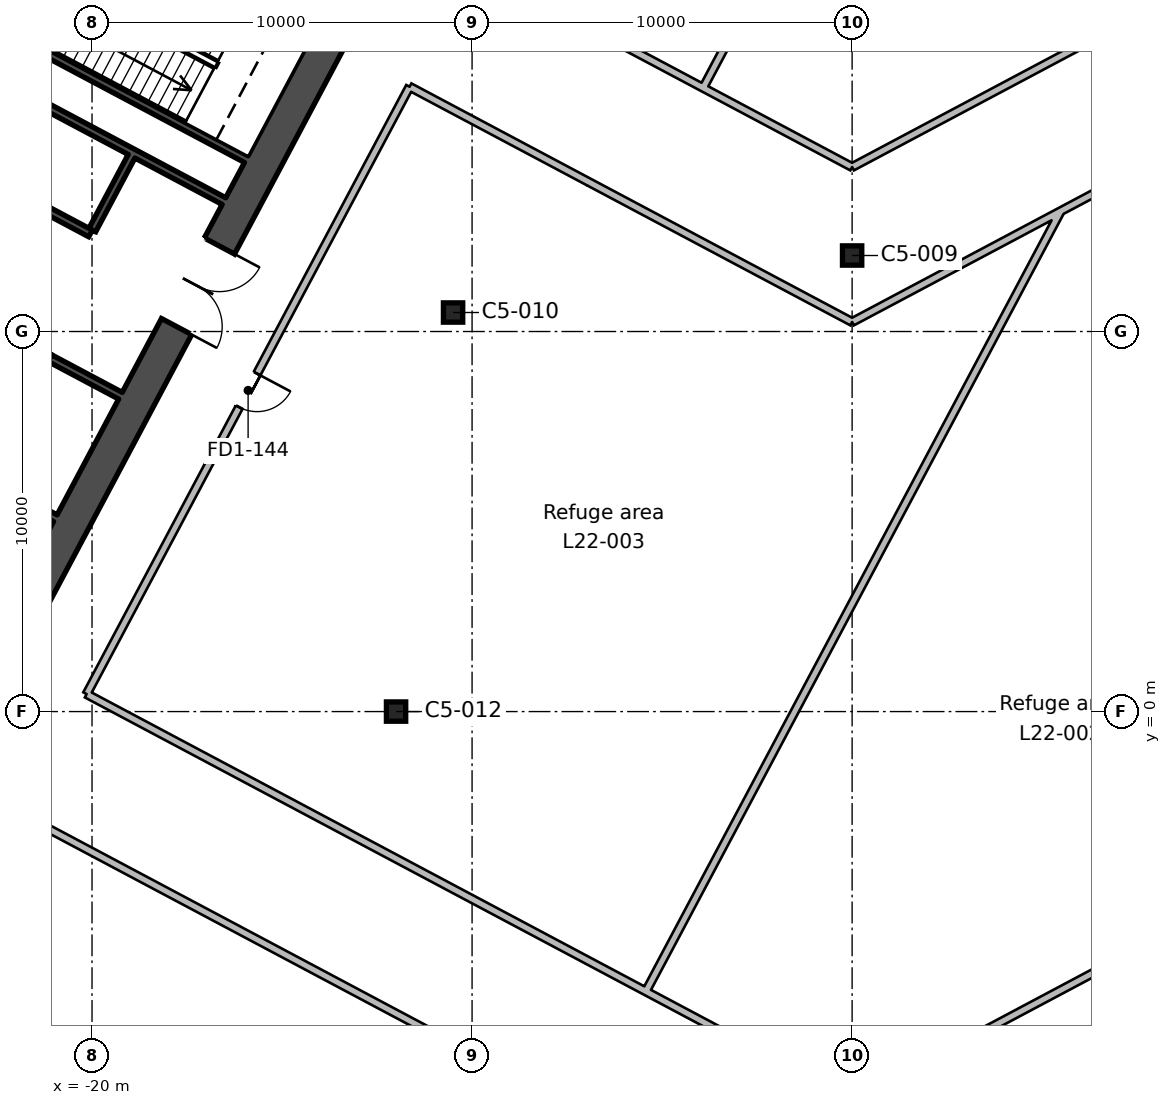
"""IFC4 building model, lengths in metres.
Left out: names, types, materials, properties, quantities, classifications, styles, units other than length and angle.
Written with IfcOpenShell. Run it as: python <this file> out.ifc"""

import sys

from ifc_helpers import new_model, si_unit, direction, frame, frame_2d, origin, origin_2d, place, context, subcontext, project, spatial, rectangle, hollow_rectangle, extrude, element, fill, save


model = new_model("IFC4")
c1 = context("Model", 3, precision=1e-05, world=origin(), true_north=direction((0.0, 1.0)))
c2 = subcontext(c1, "Body", "Model", "MODEL_VIEW")
j1 = project(units=[si_unit("LENGTHUNIT", "METRE"), si_unit("PLANEANGLEUNIT", "RADIAN")], contexts=[c1])
p1 = place(None, origin())
s1 = spatial("IfcSite", under=j1, at=p1, CompositionType="ELEMENT")
p2 = place(p1, origin())
s2 = spatial("IfcBuilding", under=s1, at=p2, CompositionType="ELEMENT")
p3 = place(p2, frame((0.0, 0.0, 112.2)))
s3 = spatial("IfcBuildingStorey", under=s2, at=p3, CompositionType="ELEMENT", Elevation=112.2)
for number, where, z_axis, x_axis in (
    (1, (-12.0, 0.0, 0.0), (0.0, 0.0, 1.0), (1.0, 0.0, 0.0)),
    (2, (-10.5, 10.5, 0.0), (0.0, 0.0, 1.0), (1.0, 0.0, 0.0)),
    (3, (0.0, 12.0, 0.0), (0.0, 0.0, 1.0), (1.0, 0.0, 0.0)),
):
    element("IfcColumn", number, at=place(p3, frame(where, z_axis=z_axis, x_axis=x_axis)), inside=s3, PredefinedType="COLUMN", context=c2, shape_type="SweptSolid", body=[
        extrude(hollow_rectangle(XDim=0.508, YDim=0.508, WallThickness=0.021, InnerFilletRadius=0.01, OuterFilletRadius=0.031, at=origin_2d()), origin(), (0.0, 0.0, 1.0), 6.0),
    ])
p4 = place(p3, frame((-13.362, 18.43, 0.0), z_axis=(0.0, 0.0, 1.0), x_axis=(-0.46947084998, -0.882947971864, 0.0)))
e4 = element("IfcWall", 4, at=p4, inside=s3, PredefinedType="SHEAR", context=c2, shape_type="SweptSolid", body=[
    extrude(rectangle(XDim=20.0, YDim=0.9, at=frame_2d((10.0, 0.0))), origin(), (0.0, 0.0, 1.0), 6.0),
])
p5 = place(p4, frame((7.0, 0.0, 0.0)))
e5 = element("IfcOpeningElement", 5, at=p5, cuts=e4, PredefinedType="OPENING", context=c2, shape_type="SweptSolid", body=[
    extrude(rectangle(XDim=2.4, YDim=2.4, at=frame_2d((1.2, 1.2))), frame((0.0, 0.46, 0.0), z_axis=(0.0, -1.0, 0.0), x_axis=(1.0, 0.0, 0.0)), (0.0, 0.0, 1.0), 0.92),
])
p6 = place(p3, frame((-18.96, 14.611, 0.0), z_axis=(0.0, 0.0, 1.0), x_axis=(-0.4694473164, -0.882960484464, 0.0)))
e6 = element("IfcWall", 6, at=p6, inside=s3, PredefinedType="SHEAR", context=c2, shape_type="SweptSolid", body=[
    extrude(rectangle(XDim=2.2, YDim=0.2, at=frame_2d((1.1, 0.0))), origin(), (0.0, 0.0, 1.0), 6.0),
])
p7 = place(p3, frame((-15.942, 14.536, 0.0), z_axis=(0.0, 0.0, 1.0), x_axis=(-0.882946947542, 0.469472776449, 0.0)))
e7 = element("IfcWall", 7, at=p7, inside=s3, PredefinedType="SHEAR", context=c2, shape_type="SweptSolid", body=[
    extrude(rectangle(XDim=8.0, YDim=0.2, at=frame_2d((4.0, 0.0))), origin(), (0.0, 0.0, 1.0), 6.0),
])
p8 = place(p3, frame((-16.529, 13.432, 0.0), z_axis=(0.0, 0.0, 1.0), x_axis=(-0.88295287151, 0.469461634952, 0.0)))
e8 = element("IfcWall", 8, at=p8, inside=s3, PredefinedType="SHEAR", context=c2, shape_type="SweptSolid", body=[
    extrude(rectangle(XDim=8.0, YDim=0.2, at=frame_2d((4.0, 0.0))), origin(), (0.0, 0.0, 1.0), 6.0),
])
p9 = place(p3, frame((-20.04, 12.581, 0.0), z_axis=(0.0, 0.0, 1.0), x_axis=(-0.882942972946, 0.469480251476, 0.0)))
e9 = element("IfcWall", 9, at=p9, inside=s3, PredefinedType="SHEAR", context=c2, shape_type="SweptSolid", body=[
    extrude(rectangle(XDim=5.4, YDim=0.2, at=frame_2d((2.7, 0.0))), origin(), (0.0, 0.0, 1.0), 6.0),
])
p10 = place(p9, frame((2.25, 0.0, 0.0)))
e10 = element("IfcOpeningElement", 10, at=p10, cuts=e9, PredefinedType="OPENING", context=c2, shape_type="SweptSolid", body=[
    extrude(rectangle(XDim=0.9, YDim=2.1, at=frame_2d((0.45, 1.05))), frame((0.0, 0.11, 0.0), z_axis=(0.0, -1.0, 0.0), x_axis=(1.0, 0.0, 0.0)), (0.0, 0.0, 1.0), 0.22),
])
p11 = place(p3, frame((-19.252, 8.311, 0.0), z_axis=(0.0, 0.0, 1.0), x_axis=(-0.882955722218, 0.469456273365, 0.0)))
e11 = element("IfcWall", 11, at=p11, inside=s3, PredefinedType="SHEAR", context=c2, shape_type="SweptSolid", body=[
    extrude(rectangle(XDim=10.0, YDim=0.2, at=frame_2d((5.0, 0.0))), origin(), (0.0, 0.0, 1.0), 6.0),
])
p12 = place(p11, frame((2.1, 0.0, 0.0)))
e12 = element("IfcOpeningElement", 12, at=p12, cuts=e11, PredefinedType="OPENING", context=c2, shape_type="SweptSolid", body=[
    extrude(rectangle(XDim=1.2, YDim=2.1, at=frame_2d((0.6, 1.05))), frame((0.0, 0.11, 0.0), z_axis=(0.0, -1.0, 0.0), x_axis=(1.0, 0.0, 0.0)), (0.0, 0.0, 1.0), 0.22),
])
p13 = place(p3, frame((-20.965, 5.088, 0.0), z_axis=(0.0, 0.0, 1.0), x_axis=(-0.882925986334, 0.469512196493, 0.0)))
e13 = element("IfcWall", 13, at=p13, inside=s3, PredefinedType="SHEAR", context=c2, shape_type="SweptSolid", body=[
    extrude(rectangle(XDim=4.5, YDim=0.2, at=frame_2d((2.25, 0.0))), origin(), (0.0, 0.0, 1.0), 6.0),
])
p14 = place(p13, frame((0.6, 0.0, 0.0)))
e14 = element("IfcOpeningElement", 14, at=p14, cuts=e13, PredefinedType="OPENING", context=c2, shape_type="SweptSolid", body=[
    extrude(rectangle(XDim=1.1, YDim=2.1, at=frame_2d((0.55, 1.05))), frame((0.0, 0.11, 0.0), z_axis=(0.0, -1.0, 0.0), x_axis=(1.0, 0.0, 0.0)), (0.0, 0.0, 1.0), 0.22),
])
p15 = place(p3, frame((-8.114, -10.013, 0.0), z_axis=(0.0, 0.0, 1.0), x_axis=(-0.882945090575, 0.469476268866, 0.0)))
e15 = element("IfcWall", 15, at=p15, inside=s3, PredefinedType="PARTITIONING", context=c2, shape_type="SweptSolid", body=[
    extrude(rectangle(XDim=41.437, YDim=0.2, at=frame_2d((20.719, 0.0))), origin(), (0.0, 0.0, 1.0), 5.55),
])
p16 = place(p15, frame((21.45, 0.0, 0.0)))
e16 = element("IfcOpeningElement", 16, at=p16, cuts=e15, PredefinedType="OPENING", context=c2, shape_type="SweptSolid", body=[
    extrude(rectangle(XDim=1.0, YDim=2.1, at=frame_2d((0.5, 1.05))), frame((0.0, 0.11, 0.0), z_axis=(0.0, -1.0, 0.0), x_axis=(1.0, 0.0, 0.0)), (0.0, 0.0, 1.0), 0.22),
])
p17 = place(p15, frame((19.75, 0.0, 0.0)))
e17 = element("IfcOpeningElement", 17, at=p17, cuts=e15, PredefinedType="OPENING", context=c2, shape_type="SweptSolid", body=[
    extrude(rectangle(XDim=1.0, YDim=2.1, at=frame_2d((0.5, 1.05))), frame((0.0, 0.11, 0.0), z_axis=(0.0, -1.0, 0.0), x_axis=(1.0, 0.0, 0.0)), (0.0, 0.0, 1.0), 0.22),
])
p18 = place(p3, frame((-32.823, 31.779, 0.0), z_axis=(0.0, 0.0, 1.0), x_axis=(0.88294925653, -0.469468433863, 0.0)))
e18 = element("IfcWall", 18, at=p18, inside=s3, PredefinedType="PARTITIONING", context=c2, shape_type="SweptSolid", body=[
    extrude(rectangle(XDim=37.174, YDim=0.2, at=frame_2d((18.587, 0.0))), origin(), (0.0, 0.0, 1.0), 5.55),
])
p19 = place(p18, frame((18.05, 0.0, 0.0)))
e19 = element("IfcOpeningElement", 19, at=p19, cuts=e18, PredefinedType="OPENING", context=c2, shape_type="SweptSolid", body=[
    extrude(rectangle(XDim=1.0, YDim=2.1, at=frame_2d((0.5, 1.05))), frame((0.0, 0.11, 0.0), z_axis=(0.0, -1.0, 0.0), x_axis=(1.0, 0.0, 0.0)), (0.0, 0.0, 1.0), 0.22),
])
p20 = place(p18, frame((9.05, 0.0, 0.0)))
e20 = element("IfcOpeningElement", 20, at=p20, cuts=e18, PredefinedType="OPENING", context=c2, shape_type="SweptSolid", body=[
    extrude(rectangle(XDim=1.0, YDim=2.1, at=frame_2d((0.5, 1.05))), frame((0.0, 0.11, 0.0), z_axis=(0.0, -1.0, 0.0), x_axis=(1.0, 0.0, 0.0)), (0.0, 0.0, 1.0), 0.22),
])
p21 = place(p3, frame((0.0, 14.327, 0.0), z_axis=(0.0, 0.0, 1.0), x_axis=(0.882944972043, 0.46947649179, 0.0)))
e21 = element("IfcWall", 21, at=p21, inside=s3, PredefinedType="PARTITIONING", context=c2, shape_type="SweptSolid", body=[
    extrude(rectangle(XDim=35.482, YDim=0.2, at=frame_2d((17.741, 0.0))), origin(), (0.0, 0.0, 1.0), 5.55),
])
p22 = place(p21, frame((25.65, 0.0, 0.0)))
e22 = element("IfcOpeningElement", 22, at=p22, cuts=e21, PredefinedType="OPENING", context=c2, shape_type="SweptSolid", body=[
    extrude(rectangle(XDim=1.0, YDim=2.1, at=frame_2d((0.5, 1.05))), frame((0.0, 0.11, 0.0), z_axis=(0.0, -1.0, 0.0), x_axis=(1.0, 0.0, 0.0)), (0.0, 0.0, 1.0), 0.22),
])
p23 = place(p21, frame((17.25, 0.0, 0.0)))
e23 = element("IfcOpeningElement", 23, at=p23, cuts=e21, PredefinedType="OPENING", context=c2, shape_type="SweptSolid", body=[
    extrude(rectangle(XDim=1.0, YDim=2.1, at=frame_2d((0.5, 1.05))), frame((0.0, 0.11, 0.0), z_axis=(0.0, -1.0, 0.0), x_axis=(1.0, 0.0, 0.0)), (0.0, 0.0, 1.0), 0.22),
])
p24 = place(p21, frame((8.55, 0.0, 0.0)))
e24 = element("IfcOpeningElement", 24, at=p24, cuts=e21, PredefinedType="OPENING", context=c2, shape_type="SweptSolid", body=[
    extrude(rectangle(XDim=1.0, YDim=2.1, at=frame_2d((0.5, 1.05))), frame((0.0, 0.11, 0.0), z_axis=(0.0, -1.0, 0.0), x_axis=(1.0, 0.0, 0.0)), (0.0, 0.0, 1.0), 0.22),
])
p25 = place(p3, frame((-20.142, 0.46, 0.0), z_axis=(0.0, 0.0, 1.0), x_axis=(0.469506937019, 0.882928783136, 0.0)))
e25 = element("IfcWall", 25, at=p25, inside=s3, PredefinedType="PARTITIONING", context=c2, shape_type="SweptSolid", body=[
    extrude(rectangle(XDim=18.1, YDim=0.2, at=frame_2d((9.05, 0.0))), origin(), (0.0, 0.0, 1.0), 5.55),
])
p26 = place(p25, frame((8.55, 0.0, 0.0)))
e26 = element("IfcOpeningElement", 26, at=p26, cuts=e25, PredefinedType="OPENING", context=c2, shape_type="SweptSolid", body=[
    extrude(rectangle(XDim=1.0, YDim=2.1, at=frame_2d((0.5, 1.05))), frame((0.0, 0.11, 0.0), z_axis=(0.0, -1.0, 0.0), x_axis=(1.0, 0.0, 0.0)), (0.0, 0.0, 1.0), 0.22),
])
p27 = place(p3, frame((-11.644, 16.441, 0.0), z_axis=(0.0, 0.0, 1.0), x_axis=(0.882949196505, -0.469468546753, 0.0)))
e27 = element("IfcWall", 27, at=p27, inside=s3, PredefinedType="PARTITIONING", context=c2, shape_type="SweptSolid", body=[
    extrude(rectangle(XDim=5.355, YDim=0.2, at=frame_2d((2.677, 0.0))), origin(), (0.0, 0.0, 1.0), 5.55),
])
p28 = place(p3, frame((-5.427, -7.364, 0.0), z_axis=(0.0, 0.0, 1.0), x_axis=(-0.882951980563, 0.469463310622, 0.0)))
e28 = element("IfcWall", 28, at=p28, inside=s3, PredefinedType="PARTITIONING", context=c2, shape_type="SweptSolid", body=[
    extrude(rectangle(XDim=16.666, YDim=0.2, at=frame_2d((8.333, 0.0))), origin(), (0.0, 0.0, 1.0), 5.55),
])
p29 = place(p3, frame((0.105, 23.984, 0.0), z_axis=(0.0, 0.0, 1.0), x_axis=(-0.469314098299, -0.883031300203, 0.0)))
e29 = element("IfcWall", 29, at=p29, inside=s3, PredefinedType="PARTITIONING", context=c2, shape_type="SweptSolid", body=[
    extrude(rectangle(XDim=8.576, YDim=0.2, at=frame_2d((4.288, 0.0))), origin(), (0.0, 0.0, 1.0), 5.55),
])
p30 = place(p3, frame((5.491, 13.169, 0.0), z_axis=(0.0, 0.0, 1.0), x_axis=(-0.882991151497, -0.469389631733, 0.0)))
e30 = element("IfcWall", 30, at=p30, inside=s3, PredefinedType="PARTITIONING", context=c2, shape_type="SweptSolid", body=[
    extrude(rectangle(XDim=6.219, YDim=0.2, at=frame_2d((3.109, 0.0))), origin(), (0.0, 0.0, 1.0), 5.55),
])
p31 = place(p3, frame((0.0, 10.25, 0.0), z_axis=(0.0, 0.0, 1.0), x_axis=(-0.882963933612, 0.469440829008, 0.0)))
e31 = element("IfcWall", 31, at=p31, inside=s3, PredefinedType="PARTITIONING", context=c2, shape_type="SweptSolid", body=[
    extrude(rectangle(XDim=7.833, YDim=0.2, at=frame_2d((3.917, 0.0))), origin(), (0.0, 0.0, 1.0), 5.55),
])
p32 = place(p3, frame((10.861, -4.475, 0.0), z_axis=(0.0, 0.0, 1.0), x_axis=(-0.882948888511, -0.469469126011, 0.0)))
e32 = element("IfcWall", 32, at=p32, inside=s3, PredefinedType="PARTITIONING", context=c2, shape_type="SweptSolid", body=[
    extrude(rectangle(XDim=12.301, YDim=0.2, at=frame_2d((6.15, 0.0))), origin(), (0.0, 0.0, 1.0), 5.55),
])
p33 = place(p3, frame((0.0, -10.25, 0.0), z_axis=(0.0, 0.0, 1.0), x_axis=(-0.882920737254, 0.469522067348, 0.0)))
e33 = element("IfcWall", 33, at=p33, inside=s3, PredefinedType="PARTITIONING", context=c2, shape_type="SweptSolid", body=[
    extrude(rectangle(XDim=6.147, YDim=0.2, at=frame_2d((3.073, 0.0))), origin(), (0.0, 0.0, 1.0), 5.55),
])
p34 = place(p3, frame((-5.427, -7.364, 0.0), z_axis=(0.0, 0.0, 1.0), x_axis=(0.469484998898, 0.88294044862, 0.0)))
e34 = element("IfcWall", 34, at=p34, inside=s3, PredefinedType="PARTITIONING", context=c2, shape_type="SweptSolid", body=[
    extrude(rectangle(XDim=23.255, YDim=0.2, at=frame_2d((11.627, 0.0))), origin(), (0.0, 0.0, 1.0), 5.55),
])
p35 = place(p3, frame((57.135, 16.052, 0.0), z_axis=(0.0, 0.0, 1.0), x_axis=(-0.882947211229, -0.469472280528, 0.0)))
e35 = element("IfcWall", 35, at=p35, inside=s3, PredefinedType="PARTITIONING", context=c2, shape_type="SweptSolid", body=[
    extrude(rectangle(XDim=60.236, YDim=0.2, at=frame_2d((30.118, 0.0))), origin(), (0.0, 0.0, 1.0), 5.55),
])
p36 = place(p35, frame((38.75, 0.0, 0.0)))
e36 = element("IfcOpeningElement", 36, at=p36, cuts=e35, PredefinedType="OPENING", context=c2, shape_type="SweptSolid", body=[
    extrude(rectangle(XDim=1.0, YDim=2.1, at=frame_2d((0.5, 1.05))), frame((0.0, 0.11, 0.0), z_axis=(0.0, -1.0, 0.0), x_axis=(1.0, 0.0, 0.0)), (0.0, 0.0, 1.0), 0.22),
])
p37 = place(p35, frame((29.65, 0.0, 0.0)))
e37 = element("IfcOpeningElement", 37, at=p37, cuts=e35, PredefinedType="OPENING", context=c2, shape_type="SweptSolid", body=[
    extrude(rectangle(XDim=1.0, YDim=2.1, at=frame_2d((0.5, 1.05))), frame((0.0, 0.11, 0.0), z_axis=(0.0, -1.0, 0.0), x_axis=(1.0, 0.0, 0.0)), (0.0, 0.0, 1.0), 0.22),
])
p38 = place(p35, frame((20.85, 0.0, 0.0)))
e38 = element("IfcOpeningElement", 38, at=p38, cuts=e35, PredefinedType="OPENING", context=c2, shape_type="SweptSolid", body=[
    extrude(rectangle(XDim=1.0, YDim=2.1, at=frame_2d((0.5, 1.05))), frame((0.0, 0.11, 0.0), z_axis=(0.0, -1.0, 0.0), x_axis=(1.0, 0.0, 0.0)), (0.0, 0.0, 1.0), 0.22),
])
p39 = place(p3, frame((8.113, 14.563, 0.0), z_axis=(0.0, 0.0, 1.0), x_axis=(-0.882966652267, -0.469435715498, 0.0)))
e39 = element("IfcWall", 39, at=p39, inside=s3, PredefinedType="PARTITIONING", context=c2, shape_type="SweptSolid", body=[
    extrude(rectangle(XDim=2.97, YDim=0.2, at=frame_2d((1.485, 0.0))), origin(), (0.0, 0.0, 1.0), 5.55),
])
p40 = place(p5, origin())
e40 = element("IfcDoor", 40, at=p40, inside=s3, OperationType="DOUBLE_DOOR_SINGLE_SWING", PredefinedType="DOOR", context=c2, shape_type="SweptSolid", body=[
    extrude(rectangle(XDim=2.4, YDim=2.4, at=frame_2d((1.2, 1.2))), frame((0.0, 0.025, 0.0), z_axis=(0.0, -1.0, 0.0), x_axis=(1.0, 0.0, 0.0)), (0.0, 0.0, 1.0), 0.05),
])
fill(e5, e40)
p41 = place(p26, frame((1.0, 0.0, 0.0), z_axis=(0.0, 0.0, 1.0), x_axis=(-1.0, 0.0, 0.0)))
e41 = element("IfcDoor", 41, at=p41, inside=s3, OperationType="SINGLE_SWING_LEFT", PredefinedType="DOOR", context=c2, shape_type="SweptSolid", body=[
    extrude(rectangle(XDim=1.0, YDim=2.1, at=frame_2d((0.5, 1.05))), frame((0.0, 0.025, 0.0), z_axis=(0.0, -1.0, 0.0), x_axis=(1.0, 0.0, 0.0)), (0.0, 0.0, 1.0), 0.05),
])
fill(e26, e41)
save(model, sys.argv[1])
